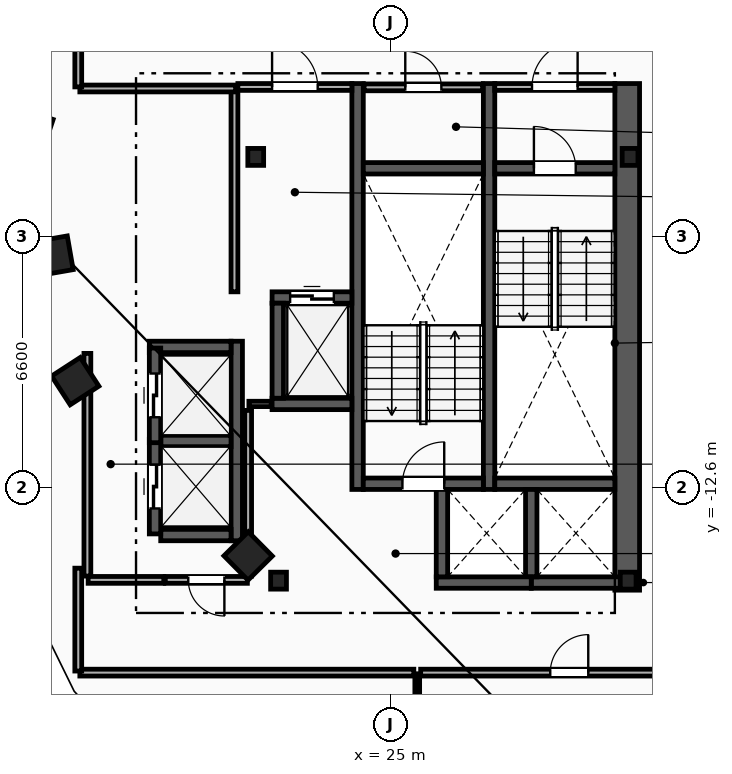
"""IFC4 building model, lengths in metres.
Left out: names, types, materials, properties, quantities, classifications, styles, units other than length and angle.
Written with IfcOpenShell. Run it as: python <this file> out.ifc"""

import sys

from ifc_helpers import new_model, si_unit, direction, frame, frame_2d, origin, origin_2d, place, context, subcontext, project, spatial, rectangle, i_section, extrude, element, fill, save


model = new_model("IFC4")
c1 = context("Model", 3, precision=1e-05, world=origin(), true_north=direction((0.0, 1.0)))
c2 = subcontext(c1, "Body", "Model", "MODEL_VIEW")
j1 = project(units=[si_unit("LENGTHUNIT", "METRE"), si_unit("PLANEANGLEUNIT", "RADIAN")], contexts=[c1])
p1 = place(None, origin())
s1 = spatial("IfcSite", under=j1, at=p1, CompositionType="ELEMENT")
p2 = place(p1, origin())
s2 = spatial("IfcBuilding", under=s1, at=p2, CompositionType="ELEMENT")
p3 = place(p2, frame((0.0, 0.0, 217.0)))
s3 = spatial("IfcBuildingStorey", under=s2, at=p3, CompositionType="ELEMENT", Elevation=217.0)
for number, where, z_axis, x_axis in (
    (1, (31.3, -3.9, 0.0), (0.0, 0.0, 1.0), (1.0, 0.0, 0.0)),
    (2, (21.45, -3.9, 0.0), (0.0, 0.0, 1.0), (1.0, 0.0, 0.0)),
    (3, (22.05, -15.05, 0.0), (0.0, 0.0, 1.0), (1.0, 0.0, 0.0)),
    (4, (31.25, -15.05, 0.0), (0.0, 0.0, 1.0), (1.0, 0.0, 0.0)),
):
    element("IfcColumn", number, at=place(p3, frame(where, z_axis=z_axis, x_axis=x_axis)), inside=s3, PredefinedType="COLUMN", context=c2, shape_type="SweptSolid", body=[
        extrude(i_section(OverallWidth=0.416, OverallDepth=0.446, WebThickness=0.039, FlangeThickness=0.063, FilletRadius=0.018, at=origin_2d()), origin(), (0.0, 0.0, 1.0), 3.6),
    ])
for number, where, z_axis, x_axis in (
    (5, (15.55, -3.2, 0.0), (0.0, 0.0, 1.0), (-0.315, -0.949, 0.0)),
    (6, (16.125, -6.5, 0.0), (0.0, 0.0, 1.0), (0.172, -0.985, 0.0)),
    (7, (16.7, -9.8, 0.0), (0.0, 0.0, 1.0), (0.544, -0.839, 0.0)),
    (8, (21.25, -14.4, 0.0), (0.0, 0.0, 1.0), (0.703, -0.711, 0.0)),
):
    element("IfcColumn", number, at=place(p3, frame(where, z_axis=z_axis, x_axis=x_axis)), inside=s3, PredefinedType="COLUMN", context=c2, shape_type="SweptSolid", body=[
        extrude(rectangle(XDim=0.9, YDim=0.9, at=origin_2d()), origin(), (0.0, 0.0, 1.0), 3.6),
    ])
p4 = place(p3, frame((31.225, -15.3, 0.0), z_axis=(0.0, 0.0, 1.0), x_axis=(0.0, 1.0, 0.0)))
e9 = element("IfcWall", 9, at=p4, inside=s3, PredefinedType="SHEAR", context=c2, shape_type="SweptSolid", body=[
    extrude(rectangle(XDim=13.33, YDim=0.65, at=frame_2d((6.665, 0.0))), origin(), (0.0, 0.0, 1.0), 3.34),
])
for number, where, z_axis, x_axis in (
    (10, (27.59, -12.65, 0.0), (0.0, 0.0, 1.0), (0.0, 1.0, 0.0)),
    (11, (24.13, -12.65, 0.0), (0.0, 0.0, 1.0), (0.0, 1.0, 0.0)),
):
    element("IfcWall", number, at=place(p3, frame(where, z_axis=z_axis, x_axis=x_axis)), inside=s3, PredefinedType="SHEAR", context=c2, shape_type="SweptSolid", body=[
        extrude(rectangle(XDim=10.68, YDim=0.3, at=frame_2d((5.34, 0.0))), origin(), (0.0, 0.0, 1.0), 3.34),
    ])
p5 = place(p3, frame((27.74, -4.2, 0.0), z_axis=(0.0, 0.0, 1.0), x_axis=(1.0, 0.0, 0.0)))
e12 = element("IfcWall", 12, at=p5, inside=s3, PredefinedType="SHEAR", context=c2, shape_type="SweptSolid", body=[
    extrude(rectangle(XDim=3.16, YDim=0.3, at=frame_2d((1.58, 0.0))), origin(), (0.0, 0.0, 1.0), 3.34),
])
p6 = place(p5, frame((1.03, 0.0, 0.0)))
e13 = element("IfcOpeningElement", 13, at=p6, cuts=e12, PredefinedType="OPENING", context=c2, shape_type="SweptSolid", body=[
    extrude(rectangle(XDim=1.1, YDim=2.15, at=frame_2d((0.55, 1.075))), frame((0.0, 0.16, 0.0), z_axis=(0.0, -1.0, 0.0), x_axis=(1.0, 0.0, 0.0)), (0.0, 0.0, 1.0), 0.32),
])
p7 = place(p3, frame((27.74, -12.5, 0.0), z_axis=(0.0, 0.0, 1.0), x_axis=(1.0, 0.0, 0.0)))
e14 = element("IfcWall", 14, at=p7, inside=s3, PredefinedType="SHEAR", context=c2, shape_type="SweptSolid", body=[
    extrude(rectangle(XDim=3.16, YDim=0.3, at=frame_2d((1.58, 0.0))), origin(), (0.0, 0.0, 1.0), 3.34),
])
p8 = place(p3, frame((24.28, -12.5, 0.0), z_axis=(0.0, 0.0, 1.0), x_axis=(1.0, 0.0, 0.0)))
e15 = element("IfcWall", 15, at=p8, inside=s3, PredefinedType="SHEAR", context=c2, shape_type="SweptSolid", body=[
    extrude(rectangle(XDim=3.16, YDim=0.3, at=frame_2d((1.58, 0.0))), origin(), (0.0, 0.0, 1.0), 3.34),
])
p9 = place(p8, frame((1.03, 0.0, 0.0)))
e16 = element("IfcOpeningElement", 16, at=p9, cuts=e15, PredefinedType="OPENING", context=c2, shape_type="SweptSolid", body=[
    extrude(rectangle(XDim=1.1, YDim=2.15, at=frame_2d((0.55, 1.075))), frame((0.0, 0.16, 0.0), z_axis=(0.0, -1.0, 0.0), x_axis=(1.0, 0.0, 0.0)), (0.0, 0.0, 1.0), 0.32),
])
p10 = place(p3, frame((24.28, -4.2, 0.0), z_axis=(0.0, 0.0, 1.0), x_axis=(1.0, 0.0, 0.0)))
e17 = element("IfcWall", 17, at=p10, inside=s3, PredefinedType="SHEAR", context=c2, shape_type="SweptSolid", body=[
    extrude(rectangle(XDim=3.16, YDim=0.3, at=frame_2d((1.58, 0.0))), origin(), (0.0, 0.0, 1.0), 3.34),
])
p11 = place(p3, frame((20.89, -7.45, 0.0), z_axis=(0.0, 0.0, 1.0), x_axis=(0.0, 1.0, 0.0)))
e18 = element("IfcWall", 18, at=p11, inside=s3, PredefinedType="PARTITIONING", context=c2, shape_type="SweptSolid", body=[
    extrude(rectangle(XDim=5.3, YDim=0.18, at=frame_2d((2.65, 0.0))), origin(), (0.0, 0.0, 1.0), 3.34),
])
p12 = place(p3, frame((20.98, -2.06, 0.0), z_axis=(0.0, 0.0, 1.0), x_axis=(1.0, 0.0, 0.0)))
e19 = element("IfcWall", 19, at=p12, inside=s3, PredefinedType="PARTITIONING", context=c2, shape_type="SweptSolid", body=[
    extrude(rectangle(XDim=3.0, YDim=0.18, at=frame_2d((1.5, 0.0))), origin(), (0.0, 0.0, 1.0), 3.34),
])
p13 = place(p12, frame((0.9, 0.0, 0.0)))
e20 = element("IfcOpeningElement", 20, at=p13, cuts=e19, PredefinedType="OPENING", context=c2, shape_type="SweptSolid", body=[
    extrude(rectangle(XDim=1.2, YDim=2.15, at=frame_2d((0.6, 1.075))), frame((0.0, 0.1, 0.0), z_axis=(0.0, -1.0, 0.0), x_axis=(1.0, 0.0, 0.0)), (0.0, 0.0, 1.0), 0.2),
])
p14 = place(p3, frame((27.74, -2.06, 0.0), z_axis=(0.0, 0.0, 1.0), x_axis=(1.0, 0.0, 0.0)))
e21 = element("IfcWall", 21, at=p14, inside=s3, PredefinedType="PARTITIONING", context=c2, shape_type="SweptSolid", body=[
    extrude(rectangle(XDim=3.16, YDim=0.18, at=frame_2d((1.58, 0.0))), origin(), (0.0, 0.0, 1.0), 3.34),
])
p15 = place(p14, frame((0.98, 0.0, 0.0)))
e22 = element("IfcOpeningElement", 22, at=p15, cuts=e21, PredefinedType="OPENING", context=c2, shape_type="SweptSolid", body=[
    extrude(rectangle(XDim=1.2, YDim=2.15, at=frame_2d((0.6, 1.075))), frame((0.0, 0.1, 0.0), z_axis=(0.0, -1.0, 0.0), x_axis=(1.0, 0.0, 0.0)), (0.0, 0.0, 1.0), 0.2),
])
p16 = place(p3, frame((21.88, -7.6, 0.0), z_axis=(0.0, 0.0, 1.0), x_axis=(1.0, 0.0, 0.0)))
e23 = element("IfcWall", 23, at=p16, inside=s3, PredefinedType="SHEAR", context=c2, shape_type="SweptSolid", body=[
    extrude(rectangle(XDim=2.1, YDim=0.3, at=frame_2d((1.05, 0.0))), origin(), (0.0, 0.0, 1.0), 3.34),
])
p17 = place(p16, frame((0.475, 0.0, 0.0)))
e24 = element("IfcOpeningElement", 24, at=p17, cuts=e23, PredefinedType="OPENING", context=c2, shape_type="SweptSolid", body=[
    extrude(rectangle(XDim=1.15, YDim=2.2, at=frame_2d((0.575, 1.1))), frame((0.0, 0.16, 0.0), z_axis=(0.0, -1.0, 0.0), x_axis=(1.0, 0.0, 0.0)), (0.0, 0.0, 1.0), 0.32),
])
p18 = place(p3, frame((21.88, -10.4, 0.0), z_axis=(0.0, 0.0, 1.0), x_axis=(1.0, 0.0, 0.0)))
e25 = element("IfcWall", 25, at=p18, inside=s3, PredefinedType="SHEAR", context=c2, shape_type="SweptSolid", body=[
    extrude(rectangle(XDim=2.1, YDim=0.3, at=frame_2d((1.05, 0.0))), origin(), (0.0, 0.0, 1.0), 3.34),
])
for number, where, z_axis, x_axis in (
    (26, (22.03, -10.25, 0.0), (0.0, 0.0, 1.0), (0.0, 1.0, 0.0)),
    (27, (28.7, -15.1, 0.0), (0.0, 0.0, 1.0), (1.0, 0.0, 0.0)),
):
    element("IfcWall", number, at=place(p3, frame(where, z_axis=z_axis, x_axis=x_axis)), inside=s3, PredefinedType="SHEAR", context=c2, shape_type="SweptSolid", body=[
        extrude(rectangle(XDim=2.5, YDim=0.3, at=frame_2d((1.25, 0.0))), origin(), (0.0, 0.0, 1.0), 3.34),
    ])
p19 = place(p3, frame((28.7, -14.95, 0.0), z_axis=(0.0, 0.0, 1.0), x_axis=(0.0, 1.0, 0.0)))
e28 = element("IfcWall", 28, at=p19, inside=s3, PredefinedType="SHEAR", context=c2, shape_type="SweptSolid", body=[
    extrude(rectangle(XDim=2.3, YDim=0.3, at=frame_2d((1.15, 0.0))), origin(), (0.0, 0.0, 1.0), 3.34),
])
p20 = place(p3, frame((26.2, -15.1, 0.0), z_axis=(0.0, 0.0, 1.0), x_axis=(1.0, 0.0, 0.0)))
e29 = element("IfcWall", 29, at=p20, inside=s3, PredefinedType="SHEAR", context=c2, shape_type="SweptSolid", body=[
    extrude(rectangle(XDim=2.5, YDim=0.3, at=frame_2d((1.25, 0.0))), origin(), (0.0, 0.0, 1.0), 3.34),
])
p21 = place(p3, frame((26.35, -14.95, 0.0), z_axis=(0.0, 0.0, 1.0), x_axis=(0.0, 1.0, 0.0)))
e30 = element("IfcWall", 30, at=p21, inside=s3, PredefinedType="SHEAR", context=c2, shape_type="SweptSolid", body=[
    extrude(rectangle(XDim=2.3, YDim=0.3, at=frame_2d((1.15, 0.0))), origin(), (0.0, 0.0, 1.0), 3.34),
])
p22 = place(p3, frame((20.95, -14.0, 0.0), z_axis=(0.0, 0.0, 1.0), x_axis=(0.0, 1.0, 0.0)))
e31 = element("IfcWall", 31, at=p22, inside=s3, PredefinedType="SHEAR", context=c2, shape_type="SweptSolid", body=[
    extrude(rectangle(XDim=5.25, YDim=0.3, at=frame_2d((2.625, 0.0))), origin(), (0.0, 0.0, 1.0), 3.34),
])
p23 = place(p3, frame((18.95, -13.85, 0.0), z_axis=(0.0, 0.0, 1.0), x_axis=(1.0, 0.0, 0.0)))
e32 = element("IfcWall", 32, at=p23, inside=s3, PredefinedType="SHEAR", context=c2, shape_type="SweptSolid", body=[
    extrude(rectangle(XDim=1.85, YDim=0.3, at=frame_2d((0.925, 0.0))), origin(), (0.0, 0.0, 1.0), 3.34),
])
p24 = place(p3, frame((18.65, -8.9, 0.0), z_axis=(0.0, 0.0, 1.0), x_axis=(1.0, 0.0, 0.0)))
e33 = element("IfcWall", 33, at=p24, inside=s3, PredefinedType="SHEAR", context=c2, shape_type="SweptSolid", body=[
    extrude(rectangle(XDim=2.15, YDim=0.3, at=frame_2d((1.075, 0.0))), origin(), (0.0, 0.0, 1.0), 3.34),
])
p25 = place(p3, frame((18.95, -11.375, 0.0), z_axis=(0.0, 0.0, 1.0), x_axis=(1.0, 0.0, 0.0)))
e34 = element("IfcWall", 34, at=p25, inside=s3, PredefinedType="SHEAR", context=c2, shape_type="SweptSolid", body=[
    extrude(rectangle(XDim=1.85, YDim=0.3, at=frame_2d((0.925, 0.0))), origin(), (0.0, 0.0, 1.0), 3.34),
])
p26 = place(p3, frame((18.8, -13.82, 0.0), z_axis=(0.0, 0.0, 1.0), x_axis=(0.0, 1.0, 0.0)))
e35 = element("IfcWall", 35, at=p26, inside=s3, PredefinedType="SHEAR", context=c2, shape_type="SweptSolid", body=[
    extrude(rectangle(XDim=2.49, YDim=0.3, at=frame_2d((1.245, 0.0))), origin(), (0.0, 0.0, 1.0), 3.34),
])
p27 = place(p26, frame((0.67, 0.0, 0.0)))
e36 = element("IfcOpeningElement", 36, at=p27, cuts=e35, PredefinedType="OPENING", context=c2, shape_type="SweptSolid", body=[
    extrude(rectangle(XDim=1.15, YDim=2.2, at=frame_2d((0.575, 1.1))), frame((0.0, 0.16, 0.0), z_axis=(0.0, -1.0, 0.0), x_axis=(1.0, 0.0, 0.0)), (0.0, 0.0, 1.0), 0.32),
])
p28 = place(p3, frame((18.8, -11.42, 0.0), z_axis=(0.0, 0.0, 1.0), x_axis=(0.0, 1.0, 0.0)))
e37 = element("IfcWall", 37, at=p28, inside=s3, PredefinedType="SHEAR", context=c2, shape_type="SweptSolid", body=[
    extrude(rectangle(XDim=2.49, YDim=0.3, at=frame_2d((1.245, 0.0))), origin(), (0.0, 0.0, 1.0), 3.34),
])
p29 = place(p28, frame((0.67, 0.0, 0.0)))
e38 = element("IfcOpeningElement", 38, at=p29, cuts=e37, PredefinedType="OPENING", context=c2, shape_type="SweptSolid", body=[
    extrude(rectangle(XDim=1.15, YDim=2.2, at=frame_2d((0.575, 1.1))), frame((0.0, 0.16, 0.0), z_axis=(0.0, -1.0, 0.0), x_axis=(1.0, 0.0, 0.0)), (0.0, 0.0, 1.0), 0.32),
])
p30 = place(p3, frame((17.02, -14.93, 0.0), z_axis=(0.0, 0.0, 1.0), x_axis=(0.0, 1.0, 0.0)))
e39 = element("IfcWall", 39, at=p30, inside=s3, PredefinedType="PARTITIONING", context=c2, shape_type="SweptSolid", body=[
    extrude(rectangle(XDim=5.86, YDim=0.18, at=frame_2d((2.93, 0.0))), origin(), (0.0, 0.0, 1.0), 3.34),
])
p31 = place(p3, frame((17.04, -15.03, 0.0), z_axis=(0.0, 0.0, 1.0), x_axis=(1.0, 0.0, 0.0)))
e40 = element("IfcWall", 40, at=p31, inside=s3, PredefinedType="PARTITIONING", context=c2, shape_type="SweptSolid", body=[
    extrude(rectangle(XDim=1.99, YDim=0.18, at=frame_2d((0.995, 0.0))), origin(), (0.0, 0.0, 1.0), 3.34),
])
p32 = place(p3, frame((21.23, -15.03, 0.0), z_axis=(0.0, 0.0, 1.0), x_axis=(-1.0, 0.0, 0.0)))
e41 = element("IfcWall", 41, at=p32, inside=s3, PredefinedType="PARTITIONING", context=c2, shape_type="SweptSolid", body=[
    extrude(rectangle(XDim=2.16, YDim=0.18, at=frame_2d((1.08, 0.0))), origin(), (0.0, 0.0, 1.0), 3.34),
])
p33 = place(p32, frame((0.605, 0.0, 0.0)))
e42 = element("IfcOpeningElement", 42, at=p33, cuts=e41, PredefinedType="OPENING", context=c2, shape_type="SweptSolid", body=[
    extrude(rectangle(XDim=0.95, YDim=2.1, at=frame_2d((0.475, 1.05))), frame((0.0, 0.1, 0.0), z_axis=(0.0, -1.0, 0.0), x_axis=(1.0, 0.0, 0.0)), (0.0, 0.0, 1.0), 0.2),
])
p34 = place(p3, frame((21.27, -10.4, 0.0), z_axis=(0.0, 0.0, 1.0), x_axis=(1.0, 0.0, 0.0)))
e43 = element("IfcWall", 43, at=p34, inside=s3, PredefinedType="PARTITIONING", context=c2, shape_type="SweptSolid", body=[
    extrude(rectangle(XDim=0.59, YDim=0.14, at=frame_2d((0.295, 0.0))), origin(), (0.0, 0.0, 1.0), 3.34),
])
p35 = place(p3, frame((21.25, -14.93, 0.0), z_axis=(0.0, 0.0, 1.0), x_axis=(0.0, 1.0, 0.0)))
e44 = element("IfcWall", 44, at=p35, inside=s3, PredefinedType="PARTITIONING", context=c2, shape_type="SweptSolid", body=[
    extrude(rectangle(XDim=4.36, YDim=0.18, at=frame_2d((2.18, 0.0))), origin(), (0.0, 0.0, 1.0), 3.34),
])
p36 = place(p3, frame((24.3, -2.07, 0.0), z_axis=(0.0, 0.0, 1.0), x_axis=(1.0, 0.0, 0.0)))
e45 = element("IfcWall", 45, at=p36, inside=s3, PredefinedType="PARTITIONING", context=c2, shape_type="SweptSolid", body=[
    extrude(rectangle(XDim=3.12, YDim=0.18, at=frame_2d((1.56, 0.0))), origin(), (0.0, 0.0, 1.0), 3.34),
])
p37 = place(p36, frame((1.085, 0.0, 0.0)))
e46 = element("IfcOpeningElement", 46, at=p37, cuts=e45, PredefinedType="OPENING", context=c2, shape_type="SweptSolid", body=[
    extrude(rectangle(XDim=0.95, YDim=2.1, at=frame_2d((0.475, 1.05))), frame((0.0, 0.1, 0.0), z_axis=(0.0, -1.0, 0.0), x_axis=(1.0, 0.0, 0.0)), (0.0, 0.0, 1.0), 0.2),
])
p38 = place(p3, frame((25.7, -24.265, 0.0), z_axis=(0.0, 0.0, 1.0), x_axis=(0.0, 1.0, 0.0)))
e47 = element("IfcWall", 47, at=p38, inside=s3, PredefinedType="PARTITIONING", context=c2, shape_type="SweptSolid", body=[
    extrude(rectangle(XDim=6.765, YDim=0.125, at=frame_2d((3.382, 0.0))), origin(), (0.0, 0.0, 1.0), 3.34),
])
p39 = place(p3, frame((25.79, -17.47, 0.0), z_axis=(0.0, 0.0, 1.0), x_axis=(1.0, 0.0, 0.0)))
e48 = element("IfcWall", 48, at=p39, inside=s3, PredefinedType="PARTITIONING", context=c2, shape_type="SweptSolid", body=[
    extrude(rectangle(XDim=7.82, YDim=0.18, at=frame_2d((3.91, 0.0))), origin(), (0.0, 0.0, 1.0), 3.34),
])
p40 = place(p39, frame((3.41, 0.0, 0.0)))
e49 = element("IfcOpeningElement", 49, at=p40, cuts=e48, PredefinedType="OPENING", context=c2, shape_type="SweptSolid", body=[
    extrude(rectangle(XDim=1.0, YDim=2.15, at=frame_2d((0.5, 1.075))), frame((0.0, 0.1, 0.0), z_axis=(0.0, -1.0, 0.0), x_axis=(1.0, 0.0, 0.0)), (0.0, 0.0, 1.0), 0.2),
])
p41 = place(p3, frame((16.822, -17.47, 0.0), z_axis=(0.0, 0.0, 1.0), x_axis=(1.0, 0.0, 0.0)))
e50 = element("IfcWall", 50, at=p41, inside=s3, PredefinedType="PARTITIONING", context=c2, shape_type="SweptSolid", body=[
    extrude(rectangle(XDim=8.789, YDim=0.18, at=frame_2d((4.394, 0.0))), origin(), (0.0, 0.0, 1.0), 3.34),
])
p42 = place(p3, frame((16.822, -2.1, 0.0), z_axis=(0.0, 0.0, 1.0), x_axis=(1.0, 0.0, 0.0)))
e51 = element("IfcWall", 51, at=p42, inside=s3, PredefinedType="PARTITIONING", context=c2, shape_type="SweptSolid", body=[
    extrude(rectangle(XDim=4.098, YDim=0.18, at=frame_2d((2.049, 0.0))), origin(), (0.0, 0.0, 1.0), 3.34),
])
p43 = place(p3, frame((16.78, -14.721, 0.0), z_axis=(0.0, 0.0, 1.0), x_axis=(0.0, -1.0, 0.0)))
e52 = element("IfcWall", 52, at=p43, inside=s3, PredefinedType="PARTITIONING", context=c2, shape_type="SweptSolid", body=[
    extrude(rectangle(XDim=2.707, YDim=0.18, at=frame_2d((1.354, 0.0))), origin(), (0.0, 0.0, 1.0), 3.34),
])
p44 = place(p3, frame((16.78, 0.329, 0.0), z_axis=(0.0, 0.0, 1.0), x_axis=(0.0, -1.0, 0.0)))
e53 = element("IfcWall", 53, at=p44, inside=s3, PredefinedType="PARTITIONING", context=c2, shape_type="SweptSolid", body=[
    extrude(rectangle(XDim=2.387, YDim=0.18, at=frame_2d((1.194, 0.0))), origin(), (0.0, 0.0, 1.0), 3.34),
])
p45 = place(p6, origin())
e54 = element("IfcDoor", 54, at=p45, inside=s3, OperationType="SINGLE_SWING_LEFT", PredefinedType="DOOR", context=c2, shape_type="SweptSolid", body=[
    extrude(rectangle(XDim=1.1, YDim=2.15, at=frame_2d((0.55, 1.075))), frame((0.0, 0.025, 0.0), z_axis=(0.0, -1.0, 0.0), x_axis=(1.0, 0.0, 0.0)), (0.0, 0.0, 1.0), 0.05),
])
fill(e13, e54)
p46 = place(p9, origin())
e55 = element("IfcDoor", 55, at=p46, inside=s3, OperationType="SINGLE_SWING_RIGHT", PredefinedType="DOOR", context=c2, shape_type="SweptSolid", body=[
    extrude(rectangle(XDim=1.1, YDim=2.15, at=frame_2d((0.55, 1.075))), frame((0.0, 0.025, 0.0), z_axis=(0.0, -1.0, 0.0), x_axis=(1.0, 0.0, 0.0)), (0.0, 0.0, 1.0), 0.05),
])
fill(e16, e55)
p47 = place(p13, origin())
e56 = element("IfcDoor", 56, at=p47, inside=s3, OperationType="SINGLE_SWING_LEFT", PredefinedType="DOOR", context=c2, shape_type="SweptSolid", body=[
    extrude(rectangle(XDim=1.2, YDim=2.15, at=frame_2d((0.6, 1.075))), frame((0.0, 0.025, 0.0), z_axis=(0.0, -1.0, 0.0), x_axis=(1.0, 0.0, 0.0)), (0.0, 0.0, 1.0), 0.05),
])
fill(e20, e56)
p48 = place(p15, origin())
e57 = element("IfcDoor", 57, at=p48, inside=s3, OperationType="SINGLE_SWING_RIGHT", PredefinedType="DOOR", context=c2, shape_type="SweptSolid", body=[
    extrude(rectangle(XDim=1.2, YDim=2.15, at=frame_2d((0.6, 1.075))), frame((0.0, 0.025, 0.0), z_axis=(0.0, -1.0, 0.0), x_axis=(1.0, 0.0, 0.0)), (0.0, 0.0, 1.0), 0.05),
])
fill(e22, e57)
p49 = place(p17, origin())
e58 = element("IfcDoor", 58, at=p49, inside=s3, OperationType="SLIDING_TO_LEFT", PredefinedType="TRAPDOOR", context=c2, shape_type="SweptSolid", body=[
    extrude(rectangle(XDim=1.15, YDim=2.2, at=frame_2d((0.575, 1.1))), frame((0.0, 0.025, 0.0), z_axis=(0.0, -1.0, 0.0), x_axis=(1.0, 0.0, 0.0)), (0.0, 0.0, 1.0), 0.05),
])
fill(e24, e58)
p50 = place(p27, origin())
e59 = element("IfcDoor", 59, at=p50, inside=s3, OperationType="SLIDING_TO_LEFT", PredefinedType="TRAPDOOR", context=c2, shape_type="SweptSolid", body=[
    extrude(rectangle(XDim=1.15, YDim=2.2, at=frame_2d((0.575, 1.1))), frame((0.0, 0.025, 0.0), z_axis=(0.0, -1.0, 0.0), x_axis=(1.0, 0.0, 0.0)), (0.0, 0.0, 1.0), 0.05),
])
fill(e36, e59)
p51 = place(p29, origin())
e60 = element("IfcDoor", 60, at=p51, inside=s3, OperationType="SLIDING_TO_LEFT", PredefinedType="TRAPDOOR", context=c2, shape_type="SweptSolid", body=[
    extrude(rectangle(XDim=1.15, YDim=2.2, at=frame_2d((0.575, 1.1))), frame((0.0, 0.025, 0.0), z_axis=(0.0, -1.0, 0.0), x_axis=(1.0, 0.0, 0.0)), (0.0, 0.0, 1.0), 0.05),
])
fill(e38, e60)
p52 = place(p40, origin())
e61 = element("IfcDoor", 61, at=p52, inside=s3, OperationType="SINGLE_SWING_RIGHT", PredefinedType="DOOR", context=c2, shape_type="SweptSolid", body=[
    extrude(rectangle(XDim=1.0, YDim=2.15, at=frame_2d((0.5, 1.075))), frame((0.0, 0.025, 0.0), z_axis=(0.0, -1.0, 0.0), x_axis=(1.0, 0.0, 0.0)), (0.0, 0.0, 1.0), 0.05),
])
fill(e49, e61)
p53 = place(p37, origin())
e62 = element("IfcDoor", 62, at=p53, inside=s3, OperationType="SINGLE_SWING_LEFT", PredefinedType="DOOR", context=c2, shape_type="SweptSolid", body=[
    extrude(rectangle(XDim=0.95, YDim=2.1, at=frame_2d((0.475, 1.05))), frame((0.0, 0.025, 0.0), z_axis=(0.0, -1.0, 0.0), x_axis=(1.0, 0.0, 0.0)), (0.0, 0.0, 1.0), 0.05),
])
fill(e46, e62)
p54 = place(p33, origin())
e63 = element("IfcDoor", 63, at=p54, inside=s3, OperationType="SINGLE_SWING_LEFT", PredefinedType="DOOR", context=c2, shape_type="SweptSolid", body=[
    extrude(rectangle(XDim=0.95, YDim=2.1, at=frame_2d((0.475, 1.05))), frame((0.0, 0.025, 0.0), z_axis=(0.0, -1.0, 0.0), x_axis=(1.0, 0.0, 0.0)), (0.0, 0.0, 1.0), 0.05),
])
fill(e42, e63)
save(model, sys.argv[1])
